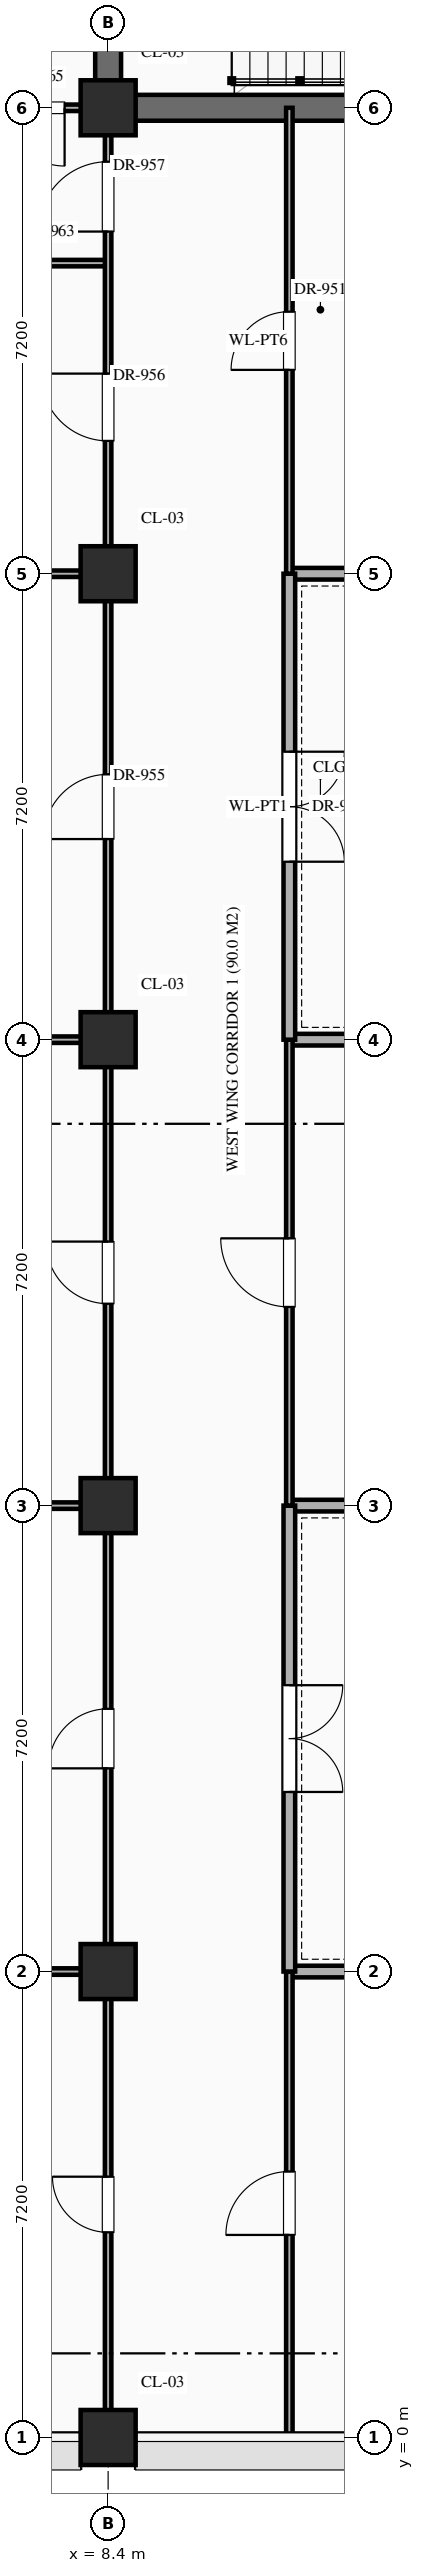
"""IFC4 building model, lengths in metres.
Left out: names, types, materials, properties, quantities, classifications, styles, units other than length and angle.
Written with IfcOpenShell. Run it as: python <this file> out.ifc"""

import sys

from ifc_helpers import new_model, si_unit, direction, frame, frame_2d, origin, origin_2d, place, context, subcontext, project, spatial, rectangle, extrude, element, fill, save


model = new_model("IFC4")
c1 = context("Model", 3, precision=1e-05, world=origin(), true_north=direction((0.0, 1.0)))
c2 = subcontext(c1, "Body", "Model", "MODEL_VIEW")
j1 = project(units=[si_unit("LENGTHUNIT", "METRE"), si_unit("PLANEANGLEUNIT", "RADIAN")], contexts=[c1])
p1 = place(None, origin())
s1 = spatial("IfcSite", under=j1, at=p1, CompositionType="ELEMENT")
p2 = place(p1, origin())
s2 = spatial("IfcBuilding", under=s1, at=p2, CompositionType="ELEMENT")
p3 = place(p2, origin())
s3 = spatial("IfcBuildingStorey", under=s2, at=p3, CompositionType="ELEMENT", Elevation=0.0)
for number, where, z_axis, x_axis in (
    (1, (8.4, 0.0, 0.0), (0.0, 0.0, 1.0), (1.0, 0.0, 0.0)),
    (2, (8.4, 7.2, 0.0), (0.0, 0.0, 1.0), (1.0, 0.0, 0.0)),
    (3, (8.4, 14.4, 0.0), (0.0, 0.0, 1.0), (1.0, 0.0, 0.0)),
    (4, (8.4, 21.6, 0.0), (0.0, 0.0, 1.0), (1.0, 0.0, 0.0)),
    (5, (8.4, 28.8, 0.0), (0.0, 0.0, 1.0), (1.0, 0.0, 0.0)),
    (6, (8.4, 36.0, 0.0), (0.0, 0.0, 1.0), (1.0, 0.0, 0.0)),
):
    element("IfcColumn", number, at=place(p3, frame(where, z_axis=z_axis, x_axis=x_axis)), inside=s3, PredefinedType="COLUMN", context=c2, shape_type="SweptSolid", body=[
        extrude(rectangle(XDim=0.85, YDim=0.85, at=origin_2d()), origin(), (0.0, 0.0, 1.0), 5.4),
    ])
p4 = place(p3, frame((0.04, 7.2, 0.0), z_axis=(0.0, 0.0, 1.0), x_axis=(1.0, 0.0, 0.0)))
e7 = element("IfcWall", 7, at=p4, inside=s3, PredefinedType="STANDARD", context=c2, shape_type="SweptSolid", body=[
    extrude(rectangle(XDim=8.36, YDim=0.1, at=frame_2d((4.18, 0.0))), origin(), (0.0, 0.0, 1.0), 4.27),
])
p5 = place(p3, frame((11.2, 7.2, 0.0), z_axis=(0.0, 0.0, 1.0), x_axis=(1.0, 0.0, 0.0)))
e8 = element("IfcWall", 8, at=p5, inside=s3, PredefinedType="STANDARD", context=c2, shape_type="SweptSolid", body=[
    extrude(rectangle(XDim=5.56, YDim=0.18, at=frame_2d((2.78, 0.0))), origin(), (0.0, 0.0, 1.0), 4.27),
])
p6 = place(p3, frame((0.04, 14.4, 0.0), z_axis=(0.0, 0.0, 1.0), x_axis=(1.0, 0.0, 0.0)))
e9 = element("IfcWall", 9, at=p6, inside=s3, PredefinedType="STANDARD", context=c2, shape_type="SweptSolid", body=[
    extrude(rectangle(XDim=8.36, YDim=0.1, at=frame_2d((4.18, 0.0))), origin(), (0.0, 0.0, 1.0), 4.27),
])
p7 = place(p3, frame((11.2, 14.4, 0.0), z_axis=(0.0, 0.0, 1.0), x_axis=(1.0, 0.0, 0.0)))
e10 = element("IfcWall", 10, at=p7, inside=s3, PredefinedType="STANDARD", context=c2, shape_type="SweptSolid", body=[
    extrude(rectangle(XDim=5.56, YDim=0.18, at=frame_2d((2.78, 0.0))), origin(), (0.0, 0.0, 1.0), 4.27),
])
p8 = place(p3, frame((0.04, 21.6, 0.0), z_axis=(0.0, 0.0, 1.0), x_axis=(1.0, 0.0, 0.0)))
e11 = element("IfcWall", 11, at=p8, inside=s3, PredefinedType="STANDARD", context=c2, shape_type="SweptSolid", body=[
    extrude(rectangle(XDim=8.36, YDim=0.1, at=frame_2d((4.18, 0.0))), origin(), (0.0, 0.0, 1.0), 4.27),
])
p9 = place(p3, frame((11.2, 21.6, 0.0), z_axis=(0.0, 0.0, 1.0), x_axis=(1.0, 0.0, 0.0)))
e12 = element("IfcWall", 12, at=p9, inside=s3, PredefinedType="STANDARD", context=c2, shape_type="SweptSolid", body=[
    extrude(rectangle(XDim=5.56, YDim=0.18, at=frame_2d((2.78, 0.0))), origin(), (0.0, 0.0, 1.0), 4.27),
])
p10 = place(p3, frame((0.04, 28.8, 0.0), z_axis=(0.0, 0.0, 1.0), x_axis=(1.0, 0.0, 0.0)))
e13 = element("IfcWall", 13, at=p10, inside=s3, PredefinedType="STANDARD", context=c2, shape_type="SweptSolid", body=[
    extrude(rectangle(XDim=8.36, YDim=0.1, at=frame_2d((4.18, 0.0))), origin(), (0.0, 0.0, 1.0), 4.27),
])
p11 = place(p3, frame((11.2, 28.8, 0.0), z_axis=(0.0, 0.0, 1.0), x_axis=(1.0, 0.0, 0.0)))
e14 = element("IfcWall", 14, at=p11, inside=s3, PredefinedType="STANDARD", context=c2, shape_type="SweptSolid", body=[
    extrude(rectangle(XDim=5.56, YDim=0.18, at=frame_2d((2.78, 0.0))), origin(), (0.0, 0.0, 1.0), 4.27),
])
p12 = place(p3, frame((0.04, 33.6, 0.0), z_axis=(0.0, 0.0, 1.0), x_axis=(1.0, 0.0, 0.0)))
e15 = element("IfcWall", 15, at=p12, inside=s3, PredefinedType="STANDARD", context=c2, shape_type="SweptSolid", body=[
    extrude(rectangle(XDim=8.36, YDim=0.1, at=frame_2d((4.18, 0.0))), origin(), (0.0, 0.0, 1.0), 5.12),
])
p13 = place(p12, frame((6.49, 0.0, 0.0)))
e16 = element("IfcOpeningElement", 16, at=p13, cuts=e15, PredefinedType="OPENING", context=c2, shape_type="SweptSolid", body=[
    extrude(rectangle(XDim=0.94, YDim=2.3, at=frame_2d((0.47, 1.15))), frame((0.0, 0.062, 0.0), z_axis=(0.0, -1.0, 0.0), x_axis=(1.0, 0.0, 0.0)), (0.0, 0.0, 1.0), 0.124),
])
p14 = place(p3, frame((0.04, 36.0, 0.0), z_axis=(0.0, 0.0, 1.0), x_axis=(1.0, 0.0, 0.0)))
e17 = element("IfcWall", 17, at=p14, inside=s3, PredefinedType="STANDARD", context=c2, shape_type="SweptSolid", body=[
    extrude(rectangle(XDim=8.36, YDim=0.1, at=frame_2d((4.18, 0.0))), origin(), (0.0, 0.0, 1.0), 4.27),
])
p15 = place(p14, frame((5.887, 0.0, 0.0)))
e18 = element("IfcOpeningElement", 18, at=p15, cuts=e17, PredefinedType="OPENING", context=c2, shape_type="SweptSolid", body=[
    extrude(rectangle(XDim=1.8, YDim=2.5, at=frame_2d((0.9, 1.25))), frame((0.0, 0.062, 0.0), z_axis=(0.0, -1.0, 0.0), x_axis=(1.0, 0.0, 0.0)), (0.0, 0.0, 1.0), 0.124),
])
p16 = place(p3, frame((8.4, 36.0, 0.0), z_axis=(0.0, 0.0, 1.0), x_axis=(1.0, 0.0, 0.0)))
e19 = element("IfcWall", 19, at=p16, inside=s3, PredefinedType="SHEAR", context=c2, shape_type="SweptSolid", body=[
    extrude(rectangle(XDim=8.36, YDim=0.4, at=frame_2d((4.18, 0.0))), origin(), (0.0, 0.0, 1.0), 5.12),
])
p17 = place(p3, frame((8.4, 0.04, 0.0), z_axis=(0.0, 0.0, 1.0), x_axis=(0.0, 1.0, 0.0)))
e20 = element("IfcWall", 20, at=p17, inside=s3, PredefinedType="STANDARD", context=c2, shape_type="SweptSolid", body=[
    extrude(rectangle(XDim=35.96, YDim=0.1, at=frame_2d((17.98, 0.0))), origin(), (0.0, 0.0, 1.0), 4.37),
])
p18 = place(p17, frame((3.13, 0.0, 0.0)))
e21 = element("IfcOpeningElement", 21, at=p18, cuts=e20, PredefinedType="OPENING", context=c2, shape_type="SweptSolid", body=[
    extrude(rectangle(XDim=0.86, YDim=2.1, at=frame_2d((0.43, 1.05))), frame((0.0, 0.062, 0.0), z_axis=(0.0, -1.0, 0.0), x_axis=(1.0, 0.0, 0.0)), (0.0, 0.0, 1.0), 0.124),
])
p19 = place(p17, frame((10.3, 0.0, 0.0)))
e22 = element("IfcOpeningElement", 22, at=p19, cuts=e20, PredefinedType="OPENING", context=c2, shape_type="SweptSolid", body=[
    extrude(rectangle(XDim=0.92, YDim=2.15, at=frame_2d((0.46, 1.075))), frame((0.0, 0.062, 0.0), z_axis=(0.0, -1.0, 0.0), x_axis=(1.0, 0.0, 0.0)), (0.0, 0.0, 1.0), 0.124),
])
p20 = place(p17, frame((17.48, 0.0, 0.0)))
e23 = element("IfcOpeningElement", 23, at=p20, cuts=e20, PredefinedType="OPENING", context=c2, shape_type="SweptSolid", body=[
    extrude(rectangle(XDim=0.96, YDim=2.2, at=frame_2d((0.48, 1.1))), frame((0.0, 0.062, 0.0), z_axis=(0.0, -1.0, 0.0), x_axis=(1.0, 0.0, 0.0)), (0.0, 0.0, 1.0), 0.124),
])
p21 = place(p17, frame((24.66, 0.0, 0.0)))
e24 = element("IfcOpeningElement", 24, at=p21, cuts=e20, PredefinedType="OPENING", context=c2, shape_type="SweptSolid", body=[
    extrude(rectangle(XDim=1.0, YDim=2.25, at=frame_2d((0.5, 1.125))), frame((0.0, 0.062, 0.0), z_axis=(0.0, -1.0, 0.0), x_axis=(1.0, 0.0, 0.0)), (0.0, 0.0, 1.0), 0.124),
])
p22 = place(p17, frame((30.812, 0.0, 0.0)))
e25 = element("IfcOpeningElement", 25, at=p22, cuts=e20, PredefinedType="OPENING", context=c2, shape_type="SweptSolid", body=[
    extrude(rectangle(XDim=1.04, YDim=2.2, at=frame_2d((0.52, 1.1))), frame((0.0, 0.062, 0.0), z_axis=(0.0, -1.0, 0.0), x_axis=(1.0, 0.0, 0.0)), (0.0, 0.0, 1.0), 0.124),
])
p23 = place(p17, frame((34.048, 0.0, 0.0)))
e26 = element("IfcOpeningElement", 26, at=p23, cuts=e20, PredefinedType="OPENING", context=c2, shape_type="SweptSolid", body=[
    extrude(rectangle(XDim=1.08, YDim=2.25, at=frame_2d((0.54, 1.125))), frame((0.0, 0.062, 0.0), z_axis=(0.0, -1.0, 0.0), x_axis=(1.0, 0.0, 0.0)), (0.0, 0.0, 1.0), 0.124),
])
p24 = place(p3, frame((8.4, 36.0, 0.0), z_axis=(0.0, 0.0, 1.0), x_axis=(0.0, 1.0, 0.0)))
e27 = element("IfcWall", 27, at=p24, inside=s3, PredefinedType="SHEAR", context=c2, shape_type="SweptSolid", body=[
    extrude(rectangle(XDim=4.8, YDim=0.4, at=frame_2d((2.4, 0.0))), origin(), (0.0, 0.0, 1.0), 5.12),
])
p25 = place(p3, frame((11.2, 0.04, 0.0), z_axis=(0.0, 0.0, 1.0), x_axis=(0.0, 1.0, 0.0)))
e28 = element("IfcWall", 28, at=p25, inside=s3, PredefinedType="STANDARD", context=c2, shape_type="SweptSolid", body=[
    extrude(rectangle(XDim=7.16, YDim=0.1, at=frame_2d((3.58, 0.0))), origin(), (0.0, 0.0, 1.0), 5.12),
])
p26 = place(p25, frame((3.09, 0.0, 0.0)))
e29 = element("IfcOpeningElement", 29, at=p26, cuts=e28, PredefinedType="OPENING", context=c2, shape_type="SweptSolid", body=[
    extrude(rectangle(XDim=0.98, YDim=2.35, at=frame_2d((0.49, 1.175))), frame((0.0, 0.062, 0.0), z_axis=(0.0, -1.0, 0.0), x_axis=(1.0, 0.0, 0.0)), (0.0, 0.0, 1.0), 0.124),
])
p27 = place(p3, frame((11.2, 7.2, 0.0), z_axis=(0.0, 0.0, 1.0), x_axis=(0.0, 1.0, 0.0)))
e30 = element("IfcWall", 30, at=p27, inside=s3, PredefinedType="STANDARD", context=c2, shape_type="SweptSolid", body=[
    extrude(rectangle(XDim=7.2, YDim=0.18, at=frame_2d((3.6, 0.0))), origin(), (0.0, 0.0, 1.0), 5.12),
])
p28 = place(p27, frame((2.775, 0.0, 0.0)))
e31 = element("IfcOpeningElement", 31, at=p28, cuts=e30, PredefinedType="OPENING", context=c2, shape_type="SweptSolid", body=[
    extrude(rectangle(XDim=1.65, YDim=2.4, at=frame_2d((0.825, 1.2))), frame((0.0, 0.102, 0.0), z_axis=(0.0, -1.0, 0.0), x_axis=(1.0, 0.0, 0.0)), (0.0, 0.0, 1.0), 0.204),
])
p29 = place(p3, frame((11.2, 14.4, 0.0), z_axis=(0.0, 0.0, 1.0), x_axis=(0.0, 1.0, 0.0)))
e32 = element("IfcWall", 32, at=p29, inside=s3, PredefinedType="STANDARD", context=c2, shape_type="SweptSolid", body=[
    extrude(rectangle(XDim=7.2, YDim=0.1, at=frame_2d((3.6, 0.0))), origin(), (0.0, 0.0, 1.0), 5.12),
])
p30 = place(p29, frame((3.07, 0.0, 0.0)))
e33 = element("IfcOpeningElement", 33, at=p30, cuts=e32, PredefinedType="OPENING", context=c2, shape_type="SweptSolid", body=[
    extrude(rectangle(XDim=1.06, YDim=2.4, at=frame_2d((0.53, 1.2))), frame((0.0, 0.062, 0.0), z_axis=(0.0, -1.0, 0.0), x_axis=(1.0, 0.0, 0.0)), (0.0, 0.0, 1.0), 0.124),
])
p31 = place(p3, frame((11.2, 21.6, 0.0), z_axis=(0.0, 0.0, 1.0), x_axis=(0.0, 1.0, 0.0)))
e34 = element("IfcWall", 34, at=p31, inside=s3, PredefinedType="STANDARD", context=c2, shape_type="SweptSolid", body=[
    extrude(rectangle(XDim=7.2, YDim=0.18, at=frame_2d((3.6, 0.0))), origin(), (0.0, 0.0, 1.0), 5.12),
])
p32 = place(p31, frame((2.75, 0.0, 0.0)))
e35 = element("IfcOpeningElement", 35, at=p32, cuts=e34, PredefinedType="OPENING", context=c2, shape_type="SweptSolid", body=[
    extrude(rectangle(XDim=1.7, YDim=2.45, at=frame_2d((0.85, 1.225))), frame((0.0, 0.102, 0.0), z_axis=(0.0, -1.0, 0.0), x_axis=(1.0, 0.0, 0.0)), (0.0, 0.0, 1.0), 0.204),
])
p33 = place(p3, frame((11.2, 28.8, 0.0), z_axis=(0.0, 0.0, 1.0), x_axis=(0.0, 1.0, 0.0)))
e36 = element("IfcWall", 36, at=p33, inside=s3, PredefinedType="STANDARD", context=c2, shape_type="SweptSolid", body=[
    extrude(rectangle(XDim=7.2, YDim=0.1, at=frame_2d((3.6, 0.0))), origin(), (0.0, 0.0, 1.0), 5.12),
])
p34 = place(p33, frame((3.15, 0.0, 0.0)))
e37 = element("IfcOpeningElement", 37, at=p34, cuts=e36, PredefinedType="OPENING", context=c2, shape_type="SweptSolid", body=[
    extrude(rectangle(XDim=0.9, YDim=2.15, at=frame_2d((0.45, 1.075))), frame((0.0, 0.062, 0.0), z_axis=(0.0, -1.0, 0.0), x_axis=(1.0, 0.0, 0.0)), (0.0, 0.0, 1.0), 0.124),
])
p35 = place(p26, origin())
e38 = element("IfcDoor", 38, at=p35, inside=s3, OperationType="SINGLE_SWING_LEFT", PredefinedType="DOOR", context=c2, shape_type="SweptSolid", body=[
    extrude(rectangle(XDim=0.98, YDim=2.35, at=frame_2d((0.49, 1.175))), frame((0.0, 0.025, 0.0), z_axis=(0.0, -1.0, 0.0), x_axis=(1.0, 0.0, 0.0)), (0.0, 0.0, 1.0), 0.05),
])
fill(e29, e38)
p36 = place(p28, frame((1.65, 0.0, 0.0), z_axis=(0.0, 0.0, 1.0), x_axis=(-1.0, 0.0, 0.0)))
e39 = element("IfcDoor", 39, at=p36, inside=s3, OperationType="DOUBLE_DOOR_SINGLE_SWING", PredefinedType="DOOR", context=c2, shape_type="SweptSolid", body=[
    extrude(rectangle(XDim=1.65, YDim=2.4, at=frame_2d((0.825, 1.2))), frame((0.0, 0.025, 0.0), z_axis=(0.0, -1.0, 0.0), x_axis=(1.0, 0.0, 0.0)), (0.0, 0.0, 1.0), 0.05),
])
fill(e31, e39)
p37 = place(p30, origin())
e40 = element("IfcDoor", 40, at=p37, inside=s3, OperationType="SINGLE_SWING_RIGHT", PredefinedType="DOOR", context=c2, shape_type="SweptSolid", body=[
    extrude(rectangle(XDim=1.06, YDim=2.4, at=frame_2d((0.53, 1.2))), frame((0.0, 0.025, 0.0), z_axis=(0.0, -1.0, 0.0), x_axis=(1.0, 0.0, 0.0)), (0.0, 0.0, 1.0), 0.05),
])
fill(e33, e40)
p38 = place(p32, frame((1.7, 0.0, 0.0), z_axis=(0.0, 0.0, 1.0), x_axis=(-1.0, 0.0, 0.0)))
e41 = element("IfcDoor", 41, at=p38, inside=s3, OperationType="DOUBLE_DOOR_SINGLE_SWING", PredefinedType="DOOR", context=c2, shape_type="SweptSolid", body=[
    extrude(rectangle(XDim=1.7, YDim=2.45, at=frame_2d((0.85, 1.225))), frame((0.0, 0.025, 0.0), z_axis=(0.0, -1.0, 0.0), x_axis=(1.0, 0.0, 0.0)), (0.0, 0.0, 1.0), 0.05),
])
fill(e35, e41)
p39 = place(p34, origin())
e42 = element("IfcDoor", 42, at=p39, inside=s3, OperationType="SINGLE_SWING_LEFT", PredefinedType="DOOR", context=c2, shape_type="SweptSolid", body=[
    extrude(rectangle(XDim=0.9, YDim=2.15, at=frame_2d((0.45, 1.075))), frame((0.0, 0.025, 0.0), z_axis=(0.0, -1.0, 0.0), x_axis=(1.0, 0.0, 0.0)), (0.0, 0.0, 1.0), 0.05),
])
fill(e37, e42)
p40 = place(p18, origin())
e43 = element("IfcDoor", 43, at=p40, inside=s3, OperationType="SINGLE_SWING_RIGHT", PredefinedType="DOOR", context=c2, shape_type="SweptSolid", body=[
    extrude(rectangle(XDim=0.86, YDim=2.1, at=frame_2d((0.43, 1.05))), frame((0.0, 0.025, 0.0), z_axis=(0.0, -1.0, 0.0), x_axis=(1.0, 0.0, 0.0)), (0.0, 0.0, 1.0), 0.05),
])
fill(e21, e43)
p41 = place(p19, origin())
e44 = element("IfcDoor", 44, at=p41, inside=s3, OperationType="SINGLE_SWING_LEFT", PredefinedType="DOOR", context=c2, shape_type="SweptSolid", body=[
    extrude(rectangle(XDim=0.92, YDim=2.15, at=frame_2d((0.46, 1.075))), frame((0.0, 0.025, 0.0), z_axis=(0.0, -1.0, 0.0), x_axis=(1.0, 0.0, 0.0)), (0.0, 0.0, 1.0), 0.05),
])
fill(e22, e44)
p42 = place(p20, origin())
e45 = element("IfcDoor", 45, at=p42, inside=s3, OperationType="SINGLE_SWING_RIGHT", PredefinedType="DOOR", context=c2, shape_type="SweptSolid", body=[
    extrude(rectangle(XDim=0.96, YDim=2.2, at=frame_2d((0.48, 1.1))), frame((0.0, 0.025, 0.0), z_axis=(0.0, -1.0, 0.0), x_axis=(1.0, 0.0, 0.0)), (0.0, 0.0, 1.0), 0.05),
])
fill(e23, e45)
p43 = place(p21, origin())
e46 = element("IfcDoor", 46, at=p43, inside=s3, OperationType="SINGLE_SWING_LEFT", PredefinedType="DOOR", context=c2, shape_type="SweptSolid", body=[
    extrude(rectangle(XDim=1.0, YDim=2.25, at=frame_2d((0.5, 1.125))), frame((0.0, 0.025, 0.0), z_axis=(0.0, -1.0, 0.0), x_axis=(1.0, 0.0, 0.0)), (0.0, 0.0, 1.0), 0.05),
])
fill(e24, e46)
p44 = place(p22, origin())
e47 = element("IfcDoor", 47, at=p44, inside=s3, OperationType="SINGLE_SWING_RIGHT", PredefinedType="DOOR", context=c2, shape_type="SweptSolid", body=[
    extrude(rectangle(XDim=1.04, YDim=2.2, at=frame_2d((0.52, 1.1))), frame((0.0, 0.025, 0.0), z_axis=(0.0, -1.0, 0.0), x_axis=(1.0, 0.0, 0.0)), (0.0, 0.0, 1.0), 0.05),
])
fill(e25, e47)
p45 = place(p23, origin())
e48 = element("IfcDoor", 48, at=p45, inside=s3, OperationType="SINGLE_SWING_LEFT", PredefinedType="DOOR", context=c2, shape_type="SweptSolid", body=[
    extrude(rectangle(XDim=1.08, YDim=2.25, at=frame_2d((0.54, 1.125))), frame((0.0, 0.025, 0.0), z_axis=(0.0, -1.0, 0.0), x_axis=(1.0, 0.0, 0.0)), (0.0, 0.0, 1.0), 0.05),
])
fill(e26, e48)
p46 = place(p15, frame((1.8, 0.0, 0.0), z_axis=(0.0, 0.0, 1.0), x_axis=(-1.0, 0.0, 0.0)))
e49 = element("IfcDoor", 49, at=p46, inside=s3, OperationType="DOUBLE_DOOR_SINGLE_SWING", PredefinedType="DOOR", context=c2, shape_type="SweptSolid", body=[
    extrude(rectangle(XDim=1.8, YDim=2.5, at=frame_2d((0.9, 1.25))), frame((0.0, 0.025, 0.0), z_axis=(0.0, -1.0, 0.0), x_axis=(1.0, 0.0, 0.0)), (0.0, 0.0, 1.0), 0.05),
])
fill(e18, e49)
save(model, sys.argv[1])
